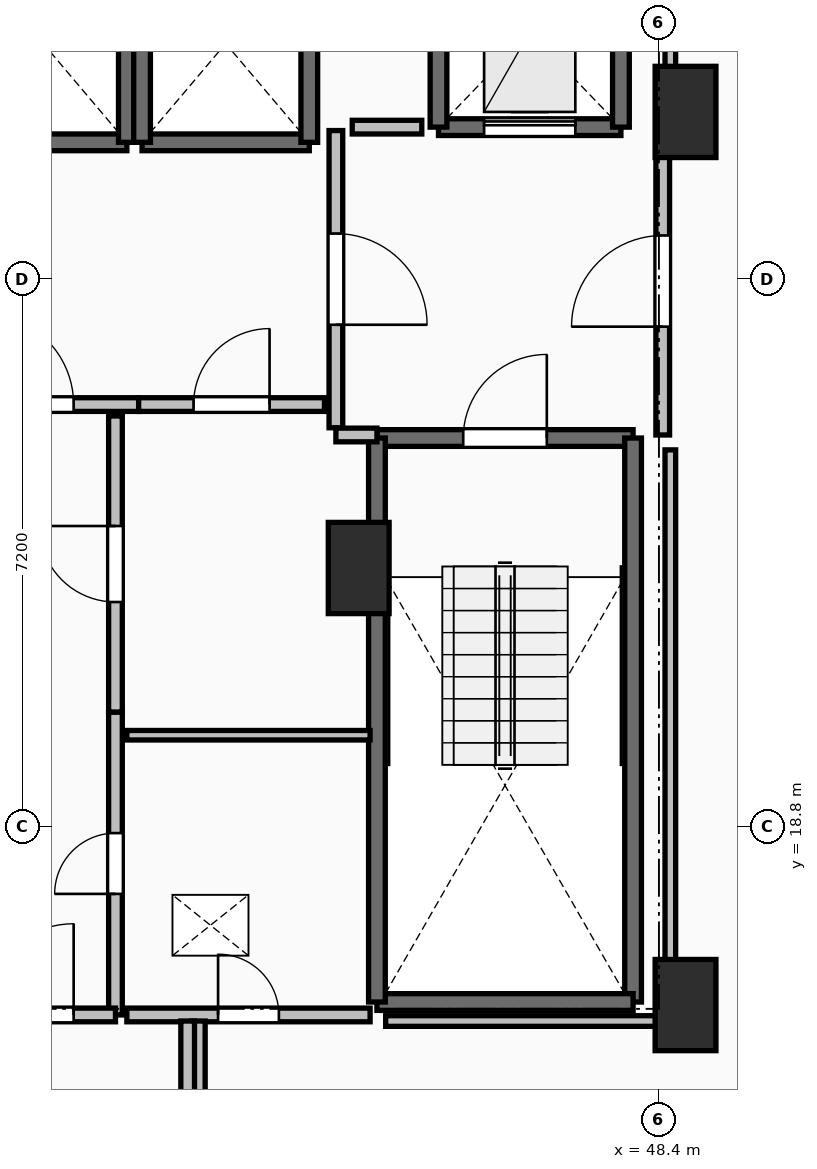
"""IFC4 building model, lengths in metres.
Left out: names, types, materials, properties, quantities, classifications, styles, units other than length and angle.
Written with IfcOpenShell. Run it as: python <this file> out.ifc"""

import sys

from ifc_helpers import new_model, si_unit, direction, frame, frame_2d, origin, origin_2d, place, context, subcontext, project, spatial, rectangle, extrude, element, fill, save


model = new_model("IFC4")
c1 = context("Model", 3, precision=1e-05, world=origin(), true_north=direction((0.0, 1.0)))
c2 = subcontext(c1, "Body", "Model", "MODEL_VIEW")
j1 = project(units=[si_unit("LENGTHUNIT", "METRE"), si_unit("PLANEANGLEUNIT", "RADIAN")], contexts=[c1])
p1 = place(None, origin())
s1 = spatial("IfcSite", under=j1, at=p1, CompositionType="ELEMENT")
p2 = place(p1, origin())
s2 = spatial("IfcBuilding", under=s1, at=p2, CompositionType="ELEMENT")
p3 = place(p2, frame((0.0, 0.0, 103.3)))
s3 = spatial("IfcBuildingStorey", under=s2, at=p3, CompositionType="ELEMENT", Elevation=103.3)
for number, where, z_axis, x_axis in (
    (1, (48.75, 28.2, 0.0), (0.0, 0.0, 1.0), (1.0, 0.0, 0.0)),
    (2, (48.75, 16.45, 0.0), (0.0, 0.0, 1.0), (1.0, 0.0, 0.0)),
    (3, (44.45, 22.2, 0.0), (0.0, 0.0, 1.0), (1.0, 0.0, 0.0)),
):
    element("IfcColumn", number, at=place(p3, frame(where, z_axis=z_axis, x_axis=x_axis)), inside=s3, PredefinedType="PILASTER", context=c2, shape_type="SweptSolid", body=[
        extrude(rectangle(XDim=0.8, YDim=1.2, at=origin_2d()), origin(), (0.0, 0.0, 1.0), 3.5),
    ])
p4 = place(p3, frame((44.69, 23.91, 0.0), z_axis=(0.0, 0.0, 1.0), x_axis=(1.0, 0.0, 0.0)))
e4 = element("IfcWall", 4, at=p4, inside=s3, PredefinedType="SOLIDWALL", context=c2, shape_type="SweptSolid", body=[
    extrude(rectangle(XDim=3.37, YDim=0.22, at=frame_2d((1.685, 0.0))), origin(), (0.0, 0.0, 1.0), 3.24),
])
p5 = place(p4, frame((1.135, 0.0, 0.0)))
e5 = element("IfcOpeningElement", 5, at=p5, cuts=e4, PredefinedType="OPENING", context=c2, shape_type="SweptSolid", body=[
    extrude(rectangle(XDim=1.1, YDim=2.15, at=frame_2d((0.55, 1.075))), frame((0.0, 0.125, 0.0), z_axis=(0.0, -1.0, 0.0), x_axis=(1.0, 0.0, 0.0)), (0.0, 0.0, 1.0), 0.25),
])
p6 = place(p3, frame((48.06, 23.91, 0.0), z_axis=(0.0, 0.0, 1.0), x_axis=(0.0, -1.0, 0.0)))
e6 = element("IfcWall", 6, at=p6, inside=s3, PredefinedType="SOLIDWALL", context=c2, shape_type="SweptSolid", body=[
    extrude(rectangle(XDim=7.42, YDim=0.22, at=frame_2d((3.71, 0.0))), origin(), (0.0, 0.0, 1.0), 3.24),
])
p7 = place(p3, frame((48.06, 16.49, 0.0), z_axis=(0.0, 0.0, 1.0), x_axis=(-1.0, 0.0, 0.0)))
e7 = element("IfcWall", 7, at=p7, inside=s3, PredefinedType="SOLIDWALL", context=c2, shape_type="SweptSolid", body=[
    extrude(rectangle(XDim=3.37, YDim=0.22, at=frame_2d((1.685, 0.0))), origin(), (0.0, 0.0, 1.0), 3.24),
])
p8 = place(p3, frame((44.69, 16.49, 0.0), z_axis=(0.0, 0.0, 1.0), x_axis=(0.0, 1.0, 0.0)))
e8 = element("IfcWall", 8, at=p8, inside=s3, PredefinedType="SOLIDWALL", context=c2, shape_type="SweptSolid", body=[
    extrude(rectangle(XDim=7.42, YDim=0.22, at=frame_2d((3.71, 0.0))), origin(), (0.0, 0.0, 1.0), 3.24),
])
p9 = place(p3, frame((39.2, 27.8, 0.0), z_axis=(0.0, 0.0, 1.0), x_axis=(1.0, 0.0, 0.0)))
e9 = element("IfcWall", 9, at=p9, inside=s3, PredefinedType="SOLIDWALL", context=c2, shape_type="SweptSolid", body=[
    extrude(rectangle(XDim=2.2, YDim=0.22, at=frame_2d((1.1, 0.0))), origin(), (0.0, 0.0, 1.0), 3.24),
])
p10 = place(p3, frame((41.4, 27.8, 0.0), z_axis=(0.0, 0.0, 1.0), x_axis=(0.0, 1.0, 0.0)))
e10 = element("IfcWall", 10, at=p10, inside=s3, PredefinedType="SOLIDWALL", context=c2, shape_type="SweptSolid", body=[
    extrude(rectangle(XDim=2.6, YDim=0.22, at=frame_2d((1.3, 0.0))), origin(), (0.0, 0.0, 1.0), 3.24),
])
p11 = place(p3, frame((41.6, 27.8, 0.0), z_axis=(0.0, 0.0, 1.0), x_axis=(1.0, 0.0, 0.0)))
e11 = element("IfcWall", 11, at=p11, inside=s3, PredefinedType="SOLIDWALL", context=c2, shape_type="SweptSolid", body=[
    extrude(rectangle(XDim=2.2, YDim=0.22, at=frame_2d((1.1, 0.0))), origin(), (0.0, 0.0, 1.0), 3.24),
])
for number, where, z_axis, x_axis in (
    (12, (43.8, 27.8, 0.0), (0.0, 0.0, 1.0), (0.0, 1.0, 0.0)),
    (13, (41.6, 30.4, 0.0), (0.0, 0.0, 1.0), (0.0, -1.0, 0.0)),
):
    element("IfcWall", number, at=place(p3, frame(where, z_axis=z_axis, x_axis=x_axis)), inside=s3, PredefinedType="SOLIDWALL", context=c2, shape_type="SweptSolid", body=[
        extrude(rectangle(XDim=2.6, YDim=0.22, at=frame_2d((1.3, 0.0))), origin(), (0.0, 0.0, 1.0), 3.24),
    ])
p12 = place(p3, frame((45.5, 28.0, 0.0), z_axis=(0.0, 0.0, 1.0), x_axis=(1.0, 0.0, 0.0)))
e14 = element("IfcWall", 14, at=p12, inside=s3, PredefinedType="SHEAR", context=c2, shape_type="SweptSolid", body=[
    extrude(rectangle(XDim=2.4, YDim=0.22, at=frame_2d((1.2, 0.0))), origin(), (0.0, 0.0, 1.0), 3.24),
])
p13 = place(p12, frame((0.6, 0.0, 0.0)))
e15 = element("IfcOpeningElement", 15, at=p13, cuts=e14, PredefinedType="OPENING", context=c2, shape_type="SweptSolid", body=[
    extrude(rectangle(XDim=1.2, YDim=2.2, at=frame_2d((0.6, 1.1))), frame((0.0, 0.125, 0.0), z_axis=(0.0, -1.0, 0.0), x_axis=(1.0, 0.0, 0.0)), (0.0, 0.0, 1.0), 0.25),
])
for number, where, z_axis, x_axis in (
    (16, (47.9, 28.0, 0.0), (0.0, 0.0, 1.0), (0.0, 1.0, 0.0)),
    (17, (45.5, 30.5, 0.0), (0.0, 0.0, 1.0), (0.0, -1.0, 0.0)),
):
    element("IfcWall", number, at=place(p3, frame(where, z_axis=z_axis, x_axis=x_axis)), inside=s3, PredefinedType="SHEAR", context=c2, shape_type="SweptSolid", body=[
        extrude(rectangle(XDim=2.5, YDim=0.22, at=frame_2d((1.25, 0.0))), origin(), (0.0, 0.0, 1.0), 3.24),
    ])
p14 = place(p3, frame((44.15, 27.955, 0.0), z_axis=(0.0, 0.0, 1.0), x_axis=(0.0, -1.0, 0.0)))
e18 = element("IfcWall", 18, at=p14, inside=s3, PredefinedType="PARTITIONING", context=c2, shape_type="SweptSolid", body=[
    extrude(rectangle(XDim=3.91, YDim=0.18, at=frame_2d((1.955, 0.0))), origin(), (0.0, 0.0, 1.0), 3.24),
])
p15 = place(p14, frame((1.355, 0.0, 0.0)))
e19 = element("IfcOpeningElement", 19, at=p15, cuts=e18, PredefinedType="OPENING", context=c2, shape_type="SweptSolid", body=[
    extrude(rectangle(XDim=1.2, YDim=2.15, at=frame_2d((0.6, 1.075))), frame((0.0, 0.105, 0.0), z_axis=(0.0, -1.0, 0.0), x_axis=(1.0, 0.0, 0.0)), (0.0, 0.0, 1.0), 0.21),
])
p16 = place(p3, frame((44.15, 23.95, 0.0), z_axis=(0.0, 0.0, 1.0), x_axis=(1.0, 0.0, 0.0)))
e20 = element("IfcWall", 20, at=p16, inside=s3, PredefinedType="PARTITIONING", context=c2, shape_type="SweptSolid", body=[
    extrude(rectangle(XDim=0.54, YDim=0.18, at=frame_2d((0.27, 0.0))), origin(), (0.0, 0.0, 1.0), 3.24),
])
p17 = place(p3, frame((48.45, 23.95, 0.0), z_axis=(0.0, 0.0, 1.0), x_axis=(0.0, 1.0, 0.0)))
e21 = element("IfcWall", 21, at=p17, inside=s3, PredefinedType="PARTITIONING", context=c2, shape_type="SweptSolid", body=[
    extrude(rectangle(XDim=4.05, YDim=0.18, at=frame_2d((2.025, 0.0))), origin(), (0.0, 0.0, 1.0), 3.24),
])
p18 = place(p17, frame((1.425, 0.0, 0.0)))
e22 = element("IfcOpeningElement", 22, at=p18, cuts=e21, PredefinedType="OPENING", context=c2, shape_type="SweptSolid", body=[
    extrude(rectangle(XDim=1.2, YDim=2.15, at=frame_2d((0.6, 1.075))), frame((0.0, 0.105, 0.0), z_axis=(0.0, -1.0, 0.0), x_axis=(1.0, 0.0, 0.0)), (0.0, 0.0, 1.0), 0.21),
])
p19 = place(p3, frame((38.645, 24.35, 0.0), z_axis=(0.0, 0.0, 1.0), x_axis=(1.0, 0.0, 0.0)))
e23 = element("IfcWall", 23, at=p19, inside=s3, PredefinedType="PARTITIONING", context=c2, shape_type="SweptSolid", body=[
    extrude(rectangle(XDim=2.91, YDim=0.18, at=frame_2d((1.455, 0.0))), origin(), (0.0, 0.0, 1.0), 3.24),
])
p20 = place(p19, frame((0.855, 0.0, 0.0)))
e24 = element("IfcOpeningElement", 24, at=p20, cuts=e23, PredefinedType="OPENING", context=c2, shape_type="SweptSolid", body=[
    extrude(rectangle(XDim=1.2, YDim=2.15, at=frame_2d((0.6, 1.075))), frame((0.0, 0.105, 0.0), z_axis=(0.0, -1.0, 0.0), x_axis=(1.0, 0.0, 0.0)), (0.0, 0.0, 1.0), 0.21),
])
p21 = place(p3, frame((41.555, 24.35, 0.0), z_axis=(0.0, 0.0, 1.0), x_axis=(1.0, 0.0, 0.0)))
e25 = element("IfcWall", 25, at=p21, inside=s3, PredefinedType="PARTITIONING", context=c2, shape_type="SweptSolid", body=[
    extrude(rectangle(XDim=2.445, YDim=0.18, at=frame_2d((1.223, 0.0))), origin(), (0.0, 0.0, 1.0), 3.24),
])
p22 = place(p21, frame((0.722, 0.0, 0.0)))
e26 = element("IfcOpeningElement", 26, at=p22, cuts=e25, PredefinedType="OPENING", context=c2, shape_type="SweptSolid", body=[
    extrude(rectangle(XDim=1.0, YDim=2.15, at=frame_2d((0.5, 1.075))), frame((0.0, 0.105, 0.0), z_axis=(0.0, -1.0, 0.0), x_axis=(1.0, 0.0, 0.0)), (0.0, 0.0, 1.0), 0.21),
])
p23 = place(p3, frame((41.25, 16.32, 0.0), z_axis=(0.0, 0.0, 1.0), x_axis=(0.0, 1.0, 0.0)))
e27 = element("IfcWall", 27, at=p23, inside=s3, PredefinedType="PARTITIONING", context=c2, shape_type="SweptSolid", body=[
    extrude(rectangle(XDim=3.985, YDim=0.18, at=frame_2d((1.992, 0.0))), origin(), (0.0, 0.0, 1.0), 3.24),
])
p24 = place(p23, frame((1.593, 0.0, 0.0)))
e28 = element("IfcOpeningElement", 28, at=p24, cuts=e27, PredefinedType="OPENING", context=c2, shape_type="SweptSolid", body=[
    extrude(rectangle(XDim=0.8, YDim=2.05, at=frame_2d((0.4, 1.025))), frame((0.0, 0.105, 0.0), z_axis=(0.0, -1.0, 0.0), x_axis=(1.0, 0.0, 0.0)), (0.0, 0.0, 1.0), 0.21),
])
p25 = place(p3, frame((41.25, 20.305, 0.0), z_axis=(0.0, 0.0, 1.0), x_axis=(0.0, 1.0, 0.0)))
e29 = element("IfcWall", 29, at=p25, inside=s3, PredefinedType="PARTITIONING", context=c2, shape_type="SweptSolid", body=[
    extrude(rectangle(XDim=3.895, YDim=0.18, at=frame_2d((1.948, 0.0))), origin(), (0.0, 0.0, 1.0), 3.24),
])
p26 = place(p25, frame((1.448, 0.0, 0.0)))
e30 = element("IfcOpeningElement", 30, at=p26, cuts=e29, PredefinedType="OPENING", context=c2, shape_type="SweptSolid", body=[
    extrude(rectangle(XDim=1.0, YDim=2.15, at=frame_2d((0.5, 1.075))), frame((0.0, 0.105, 0.0), z_axis=(0.0, -1.0, 0.0), x_axis=(1.0, 0.0, 0.0)), (0.0, 0.0, 1.0), 0.21),
])
p27 = place(p3, frame((38.95, 16.32, 0.0), z_axis=(0.0, 0.0, 1.0), x_axis=(1.0, 0.0, 0.0)))
e31 = element("IfcWall", 31, at=p27, inside=s3, PredefinedType="PARTITIONING", context=c2, shape_type="SweptSolid", body=[
    extrude(rectangle(XDim=2.3, YDim=0.18, at=frame_2d((1.15, 0.0))), origin(), (0.0, 0.0, 1.0), 3.24),
])
p28 = place(p27, frame((0.55, 0.0, 0.0)))
e32 = element("IfcOpeningElement", 32, at=p28, cuts=e31, PredefinedType="OPENING", context=c2, shape_type="SweptSolid", body=[
    extrude(rectangle(XDim=1.2, YDim=2.15, at=frame_2d((0.6, 1.075))), frame((0.0, 0.105, 0.0), z_axis=(0.0, -1.0, 0.0), x_axis=(1.0, 0.0, 0.0)), (0.0, 0.0, 1.0), 0.21),
])
p29 = place(p3, frame((44.6, 20.0, 0.0), z_axis=(0.0, 0.0, 1.0), x_axis=(-1.0, 0.0, 0.0)))
e33 = element("IfcWall", 33, at=p29, inside=s3, PredefinedType="PARTITIONING", context=c2, shape_type="SweptSolid", body=[
    extrude(rectangle(XDim=3.2, YDim=0.125, at=frame_2d((1.6, 0.0))), origin(), (0.0, 0.0, 1.0), 3.24),
])
p30 = place(p3, frame((41.4, 16.32, 0.0), z_axis=(0.0, 0.0, 1.0), x_axis=(1.0, 0.0, 0.0)))
e34 = element("IfcWall", 34, at=p30, inside=s3, PredefinedType="PARTITIONING", context=c2, shape_type="SweptSolid", body=[
    extrude(rectangle(XDim=3.2, YDim=0.18, at=frame_2d((1.6, 0.0))), origin(), (0.0, 0.0, 1.0), 3.24),
])
p31 = place(p30, frame((1.2, 0.0, 0.0)))
e35 = element("IfcOpeningElement", 35, at=p31, cuts=e34, PredefinedType="OPENING", context=c2, shape_type="SweptSolid", body=[
    extrude(rectangle(XDim=0.8, YDim=2.05, at=frame_2d((0.4, 1.025))), frame((0.0, 0.105, 0.0), z_axis=(0.0, -1.0, 0.0), x_axis=(1.0, 0.0, 0.0)), (0.0, 0.0, 1.0), 0.21),
])
for number, where, z_axis, x_axis in (
    (36, (42.34, 16.24, 0.0), (0.0, 0.0, 1.0), (0.0, -1.0, 0.0)),
    (37, (42.2, 14.1, 0.0), (0.0, 0.0, 1.0), (0.0, 1.0, 0.0)),
):
    element("IfcWall", number, at=place(p3, frame(where, z_axis=z_axis, x_axis=x_axis)), inside=s3, PredefinedType="PARTITIONING", context=c2, shape_type="SweptSolid", body=[
        extrude(rectangle(XDim=2.14, YDim=0.18, at=frame_2d((1.07, 0.0))), origin(), (0.0, 0.0, 1.0), 3.24),
    ])
p32 = place(p3, frame((45.28, 28.0, 0.0), z_axis=(0.0, 0.0, 1.0), x_axis=(-1.0, 0.0, 0.0)))
e38 = element("IfcWall", 38, at=p32, inside=s3, PredefinedType="PARTITIONING", context=c2, shape_type="SweptSolid", body=[
    extrude(rectangle(XDim=0.915, YDim=0.18, at=frame_2d((0.458, 0.0))), origin(), (0.0, 0.0, 1.0), 3.24),
])
p33 = place(p3, frame((48.55, 33.45, 0.0), z_axis=(0.0, 0.0, 1.0), x_axis=(0.0, -1.0, 0.0)))
e39 = element("IfcWall", 39, at=p33, inside=s3, PredefinedType="PARTITIONING", context=c2, shape_type="SweptSolid", body=[
    extrude(rectangle(XDim=5.254, YDim=0.14, at=frame_2d((2.627, 0.0))), origin(), (0.0, 0.0, 1.0), 2.432),
])
p34 = place(p3, frame((48.55, 23.754, 0.0), z_axis=(0.0, 0.0, 1.0), x_axis=(0.0, -1.0, 0.0)))
e40 = element("IfcWall", 40, at=p34, inside=s3, PredefinedType="PARTITIONING", context=c2, shape_type="SweptSolid", body=[
    extrude(rectangle(XDim=7.514, YDim=0.14, at=frame_2d((3.757, 0.0))), origin(), (0.0, 0.0, 1.0), 2.432),
])
p35 = place(p3, frame((48.55, 16.24, 0.0), z_axis=(0.0, 0.0, 1.0), x_axis=(-1.0, 0.0, 0.0)))
e41 = element("IfcWall", 41, at=p35, inside=s3, PredefinedType="PARTITIONING", context=c2, shape_type="SweptSolid", body=[
    extrude(rectangle(XDim=3.745, YDim=0.14, at=frame_2d((1.873, 0.0))), origin(), (0.0, 0.0, 1.0), 2.432),
])
p36 = place(p5, origin())
e42 = element("IfcDoor", 42, at=p36, inside=s3, OperationType="SINGLE_SWING_RIGHT", PredefinedType="DOOR", context=c2, shape_type="SweptSolid", body=[
    extrude(rectangle(XDim=1.1, YDim=2.15, at=frame_2d((0.55, 1.075))), frame((0.0, 0.025, 0.0), z_axis=(0.0, -1.0, 0.0), x_axis=(1.0, 0.0, 0.0)), (0.0, 0.0, 1.0), 0.05),
])
fill(e5, e42)
p37 = place(p13, origin())
e43 = element("IfcDoor", 43, at=p37, inside=s3, OperationType="SLIDING_TO_LEFT", PredefinedType="DOOR", context=c2, shape_type="SweptSolid", body=[
    extrude(rectangle(XDim=1.2, YDim=2.2, at=frame_2d((0.6, 1.1))), frame((0.0, 0.025, 0.0), z_axis=(0.0, -1.0, 0.0), x_axis=(1.0, 0.0, 0.0)), (0.0, 0.0, 1.0), 0.05),
])
fill(e15, e43)
p38 = place(p15, origin())
e44 = element("IfcDoor", 44, at=p38, inside=s3, OperationType="SINGLE_SWING_RIGHT", PredefinedType="DOOR", context=c2, shape_type="SweptSolid", body=[
    extrude(rectangle(XDim=1.2, YDim=2.15, at=frame_2d((0.6, 1.075))), frame((0.0, 0.025, 0.0), z_axis=(0.0, -1.0, 0.0), x_axis=(1.0, 0.0, 0.0)), (0.0, 0.0, 1.0), 0.05),
])
fill(e19, e44)
p39 = place(p18, origin())
e45 = element("IfcDoor", 45, at=p39, inside=s3, OperationType="SINGLE_SWING_LEFT", PredefinedType="DOOR", context=c2, shape_type="SweptSolid", body=[
    extrude(rectangle(XDim=1.2, YDim=2.15, at=frame_2d((0.6, 1.075))), frame((0.0, 0.025, 0.0), z_axis=(0.0, -1.0, 0.0), x_axis=(1.0, 0.0, 0.0)), (0.0, 0.0, 1.0), 0.05),
])
fill(e22, e45)
p40 = place(p20, origin())
e46 = element("IfcDoor", 46, at=p40, inside=s3, OperationType="SINGLE_SWING_LEFT", PredefinedType="DOOR", context=c2, shape_type="SweptSolid", body=[
    extrude(rectangle(XDim=1.2, YDim=2.15, at=frame_2d((0.6, 1.075))), frame((0.0, 0.025, 0.0), z_axis=(0.0, -1.0, 0.0), x_axis=(1.0, 0.0, 0.0)), (0.0, 0.0, 1.0), 0.05),
])
fill(e24, e46)
p41 = place(p22, origin())
e47 = element("IfcDoor", 47, at=p41, inside=s3, OperationType="SINGLE_SWING_RIGHT", PredefinedType="DOOR", context=c2, shape_type="SweptSolid", body=[
    extrude(rectangle(XDim=1.0, YDim=2.15, at=frame_2d((0.5, 1.075))), frame((0.0, 0.025, 0.0), z_axis=(0.0, -1.0, 0.0), x_axis=(1.0, 0.0, 0.0)), (0.0, 0.0, 1.0), 0.05),
])
fill(e26, e47)
p42 = place(p24, origin())
e48 = element("IfcDoor", 48, at=p42, inside=s3, OperationType="SINGLE_SWING_LEFT", PredefinedType="DOOR", context=c2, shape_type="SweptSolid", body=[
    extrude(rectangle(XDim=0.8, YDim=2.05, at=frame_2d((0.4, 1.025))), frame((0.0, 0.025, 0.0), z_axis=(0.0, -1.0, 0.0), x_axis=(1.0, 0.0, 0.0)), (0.0, 0.0, 1.0), 0.05),
])
fill(e28, e48)
p43 = place(p26, origin())
e49 = element("IfcDoor", 49, at=p43, inside=s3, OperationType="SINGLE_SWING_RIGHT", PredefinedType="DOOR", context=c2, shape_type="SweptSolid", body=[
    extrude(rectangle(XDim=1.0, YDim=2.15, at=frame_2d((0.5, 1.075))), frame((0.0, 0.025, 0.0), z_axis=(0.0, -1.0, 0.0), x_axis=(1.0, 0.0, 0.0)), (0.0, 0.0, 1.0), 0.05),
])
fill(e30, e49)
p44 = place(p28, origin())
e50 = element("IfcDoor", 50, at=p44, inside=s3, OperationType="SINGLE_SWING_RIGHT", PredefinedType="DOOR", context=c2, shape_type="SweptSolid", body=[
    extrude(rectangle(XDim=1.2, YDim=2.15, at=frame_2d((0.6, 1.075))), frame((0.0, 0.025, 0.0), z_axis=(0.0, -1.0, 0.0), x_axis=(1.0, 0.0, 0.0)), (0.0, 0.0, 1.0), 0.05),
])
fill(e32, e50)
p45 = place(p31, origin())
e51 = element("IfcDoor", 51, at=p45, inside=s3, OperationType="SINGLE_SWING_LEFT", PredefinedType="DOOR", context=c2, shape_type="SweptSolid", body=[
    extrude(rectangle(XDim=0.8, YDim=2.05, at=frame_2d((0.4, 1.025))), frame((0.0, 0.025, 0.0), z_axis=(0.0, -1.0, 0.0), x_axis=(1.0, 0.0, 0.0)), (0.0, 0.0, 1.0), 0.05),
])
fill(e35, e51)
save(model, sys.argv[1])
